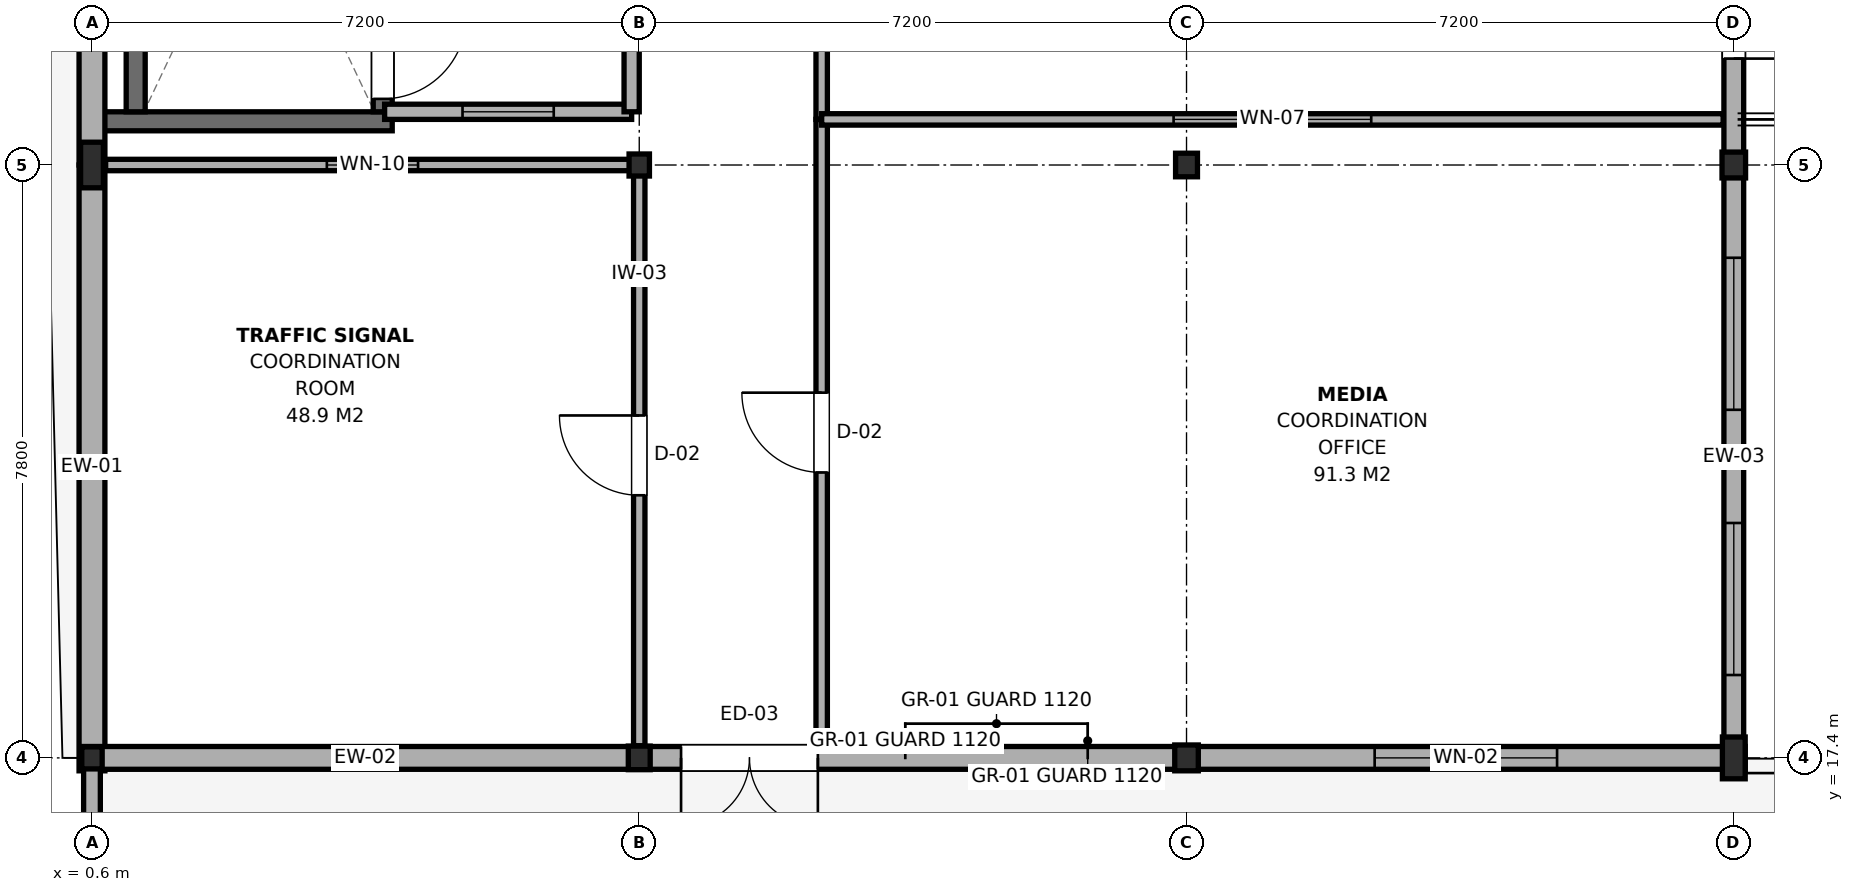
"""IFC4 building model, lengths in metres.
Left out: names, types, materials, properties, quantities, classifications, styles, units other than length and angle.
Written with IfcOpenShell. Run it as: python <this file> out.ifc"""

import sys

from ifc_helpers import new_model, si_unit, direction, frame, frame_2d, origin, origin_2d, place, context, subcontext, project, spatial, rectangle, i_section, extrude, element, fill, save


model = new_model("IFC4")
c1 = context("Model", 3, precision=1e-05, world=origin(), true_north=direction((0.0, 1.0)))
c2 = subcontext(c1, "Body", "Model", "MODEL_VIEW")
j1 = project(units=[si_unit("LENGTHUNIT", "METRE"), si_unit("PLANEANGLEUNIT", "RADIAN")], contexts=[c1])
p1 = place(None, origin())
s1 = spatial("IfcSite", under=j1, at=p1, CompositionType="ELEMENT")
p2 = place(p1, origin())
s2 = spatial("IfcBuilding", under=s1, at=p2, CompositionType="ELEMENT")
p3 = place(p2, frame((0.0, 0.0, 9.0)))
s3 = spatial("IfcBuildingStorey", under=s2, at=p3, CompositionType="ELEMENT", Elevation=9.0)
p4 = place(p3, frame((0.6, 17.4, 0.0), z_axis=(0.0, 0.0, 1.0), x_axis=(1.0, 0.0, 0.0)))
e1 = element("IfcColumn", 1, at=p4, inside=s3, PredefinedType="COLUMN", context=c2, shape_type="SweptSolid", body=[
    extrude(i_section(OverallWidth=0.268, OverallDepth=0.29, WebThickness=0.018, FlangeThickness=0.032, FilletRadius=0.024, at=origin_2d()), origin(), (0.0, 0.0, 1.0), 4.2),
])
p5 = place(p3, frame((0.6, 25.2, 0.0), z_axis=(0.0, 0.0, 1.0), x_axis=(1.0, 0.0, 0.0)))
e2 = element("IfcColumn", 2, at=p5, inside=s3, PredefinedType="COLUMN", context=c2, shape_type="SweptSolid", body=[
    extrude(i_section(OverallWidth=0.3, OverallDepth=0.6, WebThickness=0.015, FlangeThickness=0.03, FilletRadius=0.027, at=origin_2d()), origin(), (0.0, 0.0, 1.0), 4.2),
])
p6 = place(p3, frame((7.8, 17.4, 0.0), z_axis=(0.0, 0.0, 1.0), x_axis=(1.0, 0.0, 0.0)))
e3 = element("IfcColumn", 3, at=p6, inside=s3, PredefinedType="COLUMN", context=c2, shape_type="SweptSolid", body=[
    extrude(i_section(OverallWidth=0.288, OverallDepth=0.31, WebThickness=0.019, FlangeThickness=0.033, FilletRadius=0.024, at=origin_2d()), origin(), (0.0, 0.0, 1.0), 4.2),
])
p7 = place(p3, frame((7.8, 25.2, 0.0), z_axis=(0.0, 0.0, 1.0), x_axis=(1.0, 0.0, 0.0)))
e4 = element("IfcColumn", 4, at=p7, inside=s3, PredefinedType="COLUMN", context=c2, shape_type="SweptSolid", body=[
    extrude(i_section(OverallWidth=0.268, OverallDepth=0.29, WebThickness=0.018, FlangeThickness=0.032, FilletRadius=0.024, at=origin_2d()), origin(), (0.0, 0.0, 1.0), 4.2),
])
p8 = place(p3, frame((15.0, 17.4, 0.0), z_axis=(0.0, 0.0, 1.0), x_axis=(1.0, 0.0, 0.0)))
e5 = element("IfcColumn", 5, at=p8, inside=s3, PredefinedType="COLUMN", context=c2, shape_type="SweptSolid", body=[
    extrude(i_section(OverallWidth=0.31, OverallDepth=0.34, WebThickness=0.021, FlangeThickness=0.039, FilletRadius=0.027, at=origin_2d()), origin(), (0.0, 0.0, 1.0), 4.2),
])
p9 = place(p3, frame((15.0, 25.2, 0.0), z_axis=(0.0, 0.0, 1.0), x_axis=(1.0, 0.0, 0.0)))
e6 = element("IfcColumn", 6, at=p9, inside=s3, PredefinedType="COLUMN", context=c2, shape_type="SweptSolid", body=[
    extrude(i_section(OverallWidth=0.288, OverallDepth=0.31, WebThickness=0.019, FlangeThickness=0.033, FilletRadius=0.024, at=origin_2d()), origin(), (0.0, 0.0, 1.0), 4.2),
])
p10 = place(p3, frame((22.2, 17.4, 0.0), z_axis=(0.0, 0.0, 1.0), x_axis=(1.0, 0.0, 0.0)))
e7 = element("IfcColumn", 7, at=p10, inside=s3, PredefinedType="COLUMN", context=c2, shape_type="SweptSolid", body=[
    extrude(i_section(OverallWidth=0.3, OverallDepth=0.55, WebThickness=0.015, FlangeThickness=0.029, FilletRadius=0.027, at=origin_2d()), origin(), (0.0, 0.0, 1.0), 4.2),
])
p11 = place(p3, frame((22.2, 25.2, 0.0), z_axis=(0.0, 0.0, 1.0), x_axis=(1.0, 0.0, 0.0)))
e8 = element("IfcColumn", 8, at=p11, inside=s3, PredefinedType="COLUMN", context=c2, shape_type="SweptSolid", body=[
    extrude(i_section(OverallWidth=0.31, OverallDepth=0.34, WebThickness=0.021, FlangeThickness=0.039, FilletRadius=0.027, at=origin_2d()), origin(), (0.0, 0.0, 1.0), 4.2),
])
p12 = place(p3, frame((0.75, 25.775, 0.0), z_axis=(0.0, 0.0, 1.0), x_axis=(1.0, 0.0, 0.0)))
e9 = element("IfcWall", 9, at=p12, inside=s3, PredefinedType="SHEAR", context=c2, shape_type="SweptSolid", body=[
    extrude(rectangle(XDim=3.8, YDim=0.25, at=frame_2d((1.9, 0.0))), origin(), (0.0, 0.0, 1.0), 3.98),
])
p13 = place(p3, frame((1.175, 25.9, 0.0), z_axis=(0.0, 0.0, 1.0), x_axis=(0.0, 1.0, 0.0)))
e10 = element("IfcWall", 10, at=p13, inside=s3, PredefinedType="SHEAR", context=c2, shape_type="SweptSolid", body=[
    extrude(rectangle(XDim=6.4, YDim=0.25, at=frame_2d((3.2, 0.0))), origin(), (0.0, 0.0, 1.0), 3.98),
])
p14 = place(p3, frame((4.425, 25.9, 0.0), z_axis=(0.0, 0.0, 1.0), x_axis=(0.0, 1.0, 0.0)))
e11 = element("IfcWall", 11, at=p14, inside=s3, PredefinedType="SHEAR", context=c2, shape_type="SweptSolid", body=[
    extrude(rectangle(XDim=6.4, YDim=0.25, at=frame_2d((3.2, 0.0))), origin(), (0.0, 0.0, 1.0), 3.98),
])
p15 = place(p14, frame((0.17, 0.0, 0.0)))
e12 = element("IfcOpeningElement", 12, at=p15, cuts=e11, PredefinedType="OPENING", context=c2, shape_type="SweptSolid", body=[
    extrude(rectangle(XDim=1.1, YDim=2.15, at=frame_2d((0.55, 1.075))), frame((0.0, 0.14, 0.0), z_axis=(0.0, -1.0, 0.0), x_axis=(1.0, 0.0, 0.0)), (0.0, 0.0, 1.0), 0.28),
])
p16 = place(p3, frame((0.6, 17.23, 0.0), z_axis=(0.0, 0.0, 1.0), x_axis=(0.0, 1.0, 0.0)))
e13 = element("IfcWall", 13, at=p16, inside=s3, PredefinedType="SOLIDWALL", context=c2, shape_type="SweptSolid", body=[
    extrude(rectangle(XDim=7.97, YDim=0.34, at=frame_2d((3.985, 0.0))), origin(), (0.0, 0.0, 1.0), 3.525),
])
p17 = place(p3, frame((0.6, 25.2, 0.0), z_axis=(0.0, 0.0, 1.0), x_axis=(0.0, 1.0, 0.0)))
e14 = element("IfcWall", 14, at=p17, inside=s3, PredefinedType="SOLIDWALL", context=c2, shape_type="SweptSolid", body=[
    extrude(rectangle(XDim=5.6, YDim=0.34, at=frame_2d((2.8, 0.0))), origin(), (0.0, 0.0, 1.0), 3.625),
])
p18 = place(p3, frame((22.2, 17.27, 0.0), z_axis=(0.0, 0.0, 1.0), x_axis=(0.0, 1.0, 0.0)))
e15 = element("IfcWall", 15, at=p18, inside=s3, PredefinedType="SOLIDWALL", context=c2, shape_type="SweptSolid", body=[
    extrude(rectangle(XDim=7.93, YDim=0.26, at=frame_2d((3.965, 0.0))), origin(), (0.0, 0.0, 1.0), 3.525),
])
p19 = place(p18, frame((1.22, 0.0, 0.9)))
e16 = element("IfcOpeningElement", 16, at=p19, cuts=e15, PredefinedType="OPENING", context=c2, shape_type="SweptSolid", body=[
    extrude(rectangle(XDim=2.0, YDim=1.8, at=frame_2d((1.0, 0.9))), frame((0.0, 0.145, 0.0), z_axis=(0.0, -1.0, 0.0), x_axis=(1.0, 0.0, 0.0)), (0.0, 0.0, 1.0), 0.29),
])
p20 = place(p18, frame((4.71, 0.0, 0.9)))
e17 = element("IfcOpeningElement", 17, at=p20, cuts=e15, PredefinedType="OPENING", context=c2, shape_type="SweptSolid", body=[
    extrude(rectangle(XDim=2.0, YDim=1.8, at=frame_2d((1.0, 0.9))), frame((0.0, 0.145, 0.0), z_axis=(0.0, -1.0, 0.0), x_axis=(1.0, 0.0, 0.0)), (0.0, 0.0, 1.0), 0.29),
])
p21 = place(p3, frame((22.2, 25.2, 0.0), z_axis=(0.0, 0.0, 1.0), x_axis=(0.0, 1.0, 0.0)))
e18 = element("IfcWall", 18, at=p21, inside=s3, PredefinedType="SOLIDWALL", context=c2, shape_type="SweptSolid", body=[
    extrude(rectangle(XDim=5.6, YDim=0.26, at=frame_2d((2.8, 0.0))), origin(), (0.0, 0.0, 1.0), 3.525),
])
p22 = place(p21, frame((1.4, 0.0, 0.0)))
e19 = element("IfcOpeningElement", 19, at=p22, cuts=e18, PredefinedType="OPENING", context=c2, shape_type="SweptSolid", body=[
    extrude(rectangle(XDim=1.8, YDim=2.2, at=frame_2d((0.9, 1.1))), frame((0.0, 0.145, 0.0), z_axis=(0.0, -1.0, 0.0), x_axis=(1.0, 0.0, 0.0)), (0.0, 0.0, 1.0), 0.29),
])
p23 = place(p3, frame((0.45, 17.4, 0.0), z_axis=(0.0, 0.0, 1.0), x_axis=(1.0, 0.0, 0.0)))
e20 = element("IfcWall", 20, at=p23, inside=s3, PredefinedType="SOLIDWALL", context=c2, shape_type="SweptSolid", body=[
    extrude(rectangle(XDim=7.35, YDim=0.3, at=frame_2d((3.675, 0.0))), origin(), (0.0, 0.0, 1.0), 3.625),
])
p24 = place(p3, frame((7.8, 17.4, 0.0), z_axis=(0.0, 0.0, 1.0), x_axis=(1.0, 0.0, 0.0)))
e21 = element("IfcWall", 21, at=p24, inside=s3, PredefinedType="SOLIDWALL", context=c2, shape_type="SweptSolid", body=[
    extrude(rectangle(XDim=7.2, YDim=0.3, at=frame_2d((3.6, 0.0))), origin(), (0.0, 0.0, 1.0), 3.375),
])
p25 = place(p24, frame((0.55, 0.0, 0.0)))
e22 = element("IfcOpeningElement", 22, at=p25, cuts=e21, PredefinedType="OPENING", context=c2, shape_type="SweptSolid", body=[
    extrude(rectangle(XDim=1.8, YDim=2.2, at=frame_2d((0.9, 1.1))), frame((0.0, 0.165, 0.0), z_axis=(0.0, -1.0, 0.0), x_axis=(1.0, 0.0, 0.0)), (0.0, 0.0, 1.0), 0.33),
])
p26 = place(p3, frame((15.0, 17.4, 0.0), z_axis=(0.0, 0.0, 1.0), x_axis=(1.0, 0.0, 0.0)))
e23 = element("IfcWall", 23, at=p26, inside=s3, PredefinedType="SOLIDWALL", context=c2, shape_type="SweptSolid", body=[
    extrude(rectangle(XDim=7.35, YDim=0.3, at=frame_2d((3.675, 0.0))), origin(), (0.0, 0.0, 1.0), 3.375),
])
p27 = place(p26, frame((2.475, 0.0, 0.9)))
e24 = element("IfcOpeningElement", 24, at=p27, cuts=e23, PredefinedType="OPENING", context=c2, shape_type="SweptSolid", body=[
    extrude(rectangle(XDim=2.4, YDim=2.1, at=frame_2d((1.2, 1.05))), frame((0.0, 0.165, 0.0), z_axis=(0.0, -1.0, 0.0), x_axis=(1.0, 0.0, 0.0)), (0.0, 0.0, 1.0), 0.33),
])
p28 = place(p3, frame((0.6, 17.4, 0.0), z_axis=(0.0, 0.0, 1.0), x_axis=(0.0, -1.0, 0.0)))
e25 = element("IfcWall", 25, at=p28, inside=s3, PredefinedType="PARAPET", context=c2, shape_type="SweptSolid", body=[
    extrude(rectangle(XDim=16.2, YDim=0.22, at=frame_2d((8.1, 0.0))), origin(), (0.0, 0.0, 1.0), 1.15),
])
p29 = place(p3, frame((4.45, 25.9, 0.0), z_axis=(0.0, 0.0, 1.0), x_axis=(1.0, 0.0, 0.0)))
e26 = element("IfcWall", 26, at=p29, inside=s3, PredefinedType="PARTITIONING", context=c2, shape_type="SweptSolid", body=[
    extrude(rectangle(XDim=3.25, YDim=0.2, at=frame_2d((1.625, 0.0))), origin(), (0.0, 0.0, 1.0), 3.475),
])
p30 = place(p29, frame((1.025, 0.0, 0.95)))
e27 = element("IfcOpeningElement", 27, at=p30, cuts=e26, PredefinedType="OPENING", context=c2, shape_type="SweptSolid", body=[
    extrude(rectangle(XDim=1.2, YDim=1.5, at=frame_2d((0.6, 0.75))), frame((0.0, 0.115, 0.0), z_axis=(0.0, -1.0, 0.0), x_axis=(1.0, 0.0, 0.0)), (0.0, 0.0, 1.0), 0.23),
])
p31 = place(p3, frame((7.7, 25.9, 0.0), z_axis=(0.0, 0.0, 1.0), x_axis=(0.0, 1.0, 0.0)))
e28 = element("IfcWall", 28, at=p31, inside=s3, PredefinedType="PARTITIONING", context=c2, shape_type="SweptSolid", body=[
    extrude(rectangle(XDim=3.6, YDim=0.2, at=frame_2d((1.8, 0.0))), origin(), (0.0, 0.0, 1.0), 3.475),
])
p32 = place(p31, frame((1.25, 0.0, 0.0)))
e29 = element("IfcOpeningElement", 29, at=p32, cuts=e28, PredefinedType="OPENING", context=c2, shape_type="SweptSolid", body=[
    extrude(rectangle(XDim=1.1, YDim=2.15, at=frame_2d((0.55, 1.075))), frame((0.0, 0.115, 0.0), z_axis=(0.0, -1.0, 0.0), x_axis=(1.0, 0.0, 0.0)), (0.0, 0.0, 1.0), 0.23),
])
p33 = place(p3, frame((7.8, 17.56, 0.0), z_axis=(0.0, 0.0, 1.0), x_axis=(0.0, 1.0, 0.0)))
e30 = element("IfcWall", 30, at=p33, inside=s3, PredefinedType="PARTITIONING", context=c2, shape_type="SweptSolid", body=[
    extrude(rectangle(XDim=7.64, YDim=0.15, at=frame_2d((3.82, 0.0))), origin(), (0.0, 0.0, 1.0), 3.425),
])
p34 = place(p33, frame((3.295, 0.0, 0.0)))
e31 = element("IfcOpeningElement", 31, at=p34, cuts=e30, PredefinedType="OPENING", context=c2, shape_type="SweptSolid", body=[
    extrude(rectangle(XDim=1.05, YDim=2.15, at=frame_2d((0.525, 1.075))), frame((0.0, 0.09, 0.0), z_axis=(0.0, -1.0, 0.0), x_axis=(1.0, 0.0, 0.0)), (0.0, 0.0, 1.0), 0.18),
])
p35 = place(p3, frame((0.78, 25.2, 0.0), z_axis=(0.0, 0.0, 1.0), x_axis=(1.0, 0.0, 0.0)))
e32 = element("IfcWall", 32, at=p35, inside=s3, PredefinedType="PARTITIONING", context=c2, shape_type="SweptSolid", body=[
    extrude(rectangle(XDim=7.02, YDim=0.15, at=frame_2d((3.51, 0.0))), origin(), (0.0, 0.0, 1.0), 3.425),
])
p36 = place(p35, frame((2.91, 0.0, 0.95)))
e33 = element("IfcOpeningElement", 33, at=p36, cuts=e32, PredefinedType="OPENING", context=c2, shape_type="SweptSolid", body=[
    extrude(rectangle(XDim=1.2, YDim=1.5, at=frame_2d((0.6, 0.75))), frame((0.0, 0.09, 0.0), z_axis=(0.0, -1.0, 0.0), x_axis=(1.0, 0.0, 0.0)), (0.0, 0.0, 1.0), 0.18),
])
p37 = place(p3, frame((10.2, 17.56, 0.0), z_axis=(0.0, 0.0, 1.0), x_axis=(0.0, 1.0, 0.0)))
e34 = element("IfcWall", 34, at=p37, inside=s3, PredefinedType="PARTITIONING", context=c2, shape_type="SweptSolid", body=[
    extrude(rectangle(XDim=8.24, YDim=0.15, at=frame_2d((4.12, 0.0))), origin(), (0.0, 0.0, 1.0), 3.475),
])
p38 = place(p37, frame((3.595, 0.0, 0.0)))
e35 = element("IfcOpeningElement", 35, at=p38, cuts=e34, PredefinedType="OPENING", context=c2, shape_type="SweptSolid", body=[
    extrude(rectangle(XDim=1.05, YDim=2.15, at=frame_2d((0.525, 1.075))), frame((0.0, 0.09, 0.0), z_axis=(0.0, -1.0, 0.0), x_axis=(1.0, 0.0, 0.0)), (0.0, 0.0, 1.0), 0.18),
])
p39 = place(p3, frame((10.2, 25.8, 0.0), z_axis=(0.0, 0.0, 1.0), x_axis=(0.0, 1.0, 0.0)))
e36 = element("IfcWall", 36, at=p39, inside=s3, PredefinedType="PARTITIONING", context=c2, shape_type="SweptSolid", body=[
    extrude(rectangle(XDim=3.8, YDim=0.15, at=frame_2d((1.9, 0.0))), origin(), (0.0, 0.0, 1.0), 3.975),
])
p40 = place(p39, frame((1.15, 0.0, 0.0)))
e37 = element("IfcOpeningElement", 37, at=p40, cuts=e36, PredefinedType="OPENING", context=c2, shape_type="SweptSolid", body=[
    extrude(rectangle(XDim=1.5, YDim=2.15, at=frame_2d((0.75, 1.075))), frame((0.0, 0.09, 0.0), z_axis=(0.0, -1.0, 0.0), x_axis=(1.0, 0.0, 0.0)), (0.0, 0.0, 1.0), 0.18),
])
p41 = place(p3, frame((10.2, 25.8, 0.0), z_axis=(0.0, 0.0, 1.0), x_axis=(1.0, 0.0, 0.0)))
e38 = element("IfcWall", 38, at=p41, inside=s3, PredefinedType="PARTITIONING", context=c2, shape_type="SweptSolid", body=[
    extrude(rectangle(XDim=11.86, YDim=0.15, at=frame_2d((5.93, 0.0))), origin(), (0.0, 0.0, 1.0), 3.375),
])
p42 = place(p41, frame((4.63, 0.0, 0.95)))
e39 = element("IfcOpeningElement", 39, at=p42, cuts=e38, PredefinedType="OPENING", context=c2, shape_type="SweptSolid", body=[
    extrude(rectangle(XDim=2.6, YDim=1.5, at=frame_2d((1.3, 0.75))), frame((0.0, 0.09, 0.0), z_axis=(0.0, -1.0, 0.0), x_axis=(1.0, 0.0, 0.0)), (0.0, 0.0, 1.0), 0.18),
])
p43 = place(p19, origin())
e40 = element("IfcWindow", 40, at=p43, inside=s3, PartitioningType="SINGLE_PANEL", PredefinedType="WINDOW", context=c2, shape_type="SweptSolid", body=[
    extrude(rectangle(XDim=2.0, YDim=1.8, at=frame_2d((1.0, 0.9))), frame((0.0, 0.03, 0.0), z_axis=(0.0, -1.0, 0.0), x_axis=(1.0, 0.0, 0.0)), (0.0, 0.0, 1.0), 0.06),
])
fill(e16, e40)
p44 = place(p20, origin())
e41 = element("IfcWindow", 41, at=p44, inside=s3, PartitioningType="SINGLE_PANEL", PredefinedType="WINDOW", context=c2, shape_type="SweptSolid", body=[
    extrude(rectangle(XDim=2.0, YDim=1.8, at=frame_2d((1.0, 0.9))), frame((0.0, 0.03, 0.0), z_axis=(0.0, -1.0, 0.0), x_axis=(1.0, 0.0, 0.0)), (0.0, 0.0, 1.0), 0.06),
])
fill(e17, e41)
p45 = place(p22, frame((1.8, 0.0, 0.0), z_axis=(0.0, 0.0, 1.0), x_axis=(-1.0, 0.0, 0.0)))
e42 = element("IfcDoor", 42, at=p45, inside=s3, OperationType="DOUBLE_DOOR_SINGLE_SWING", PredefinedType="DOOR", context=c2, shape_type="SweptSolid", body=[
    extrude(rectangle(XDim=1.8, YDim=2.2, at=frame_2d((0.9, 1.1))), frame((0.0, 0.025, 0.0), z_axis=(0.0, -1.0, 0.0), x_axis=(1.0, 0.0, 0.0)), (0.0, 0.0, 1.0), 0.05),
])
fill(e19, e42)
p46 = place(p25, frame((1.8, 0.0, 0.0), z_axis=(0.0, 0.0, 1.0), x_axis=(-1.0, 0.0, 0.0)))
e43 = element("IfcDoor", 43, at=p46, inside=s3, OperationType="DOUBLE_DOOR_SINGLE_SWING", PredefinedType="DOOR", context=c2, shape_type="SweptSolid", body=[
    extrude(rectangle(XDim=1.8, YDim=2.2, at=frame_2d((0.9, 1.1))), frame((0.0, 0.025, 0.0), z_axis=(0.0, -1.0, 0.0), x_axis=(1.0, 0.0, 0.0)), (0.0, 0.0, 1.0), 0.05),
])
fill(e22, e43)
p47 = place(p27, origin())
e44 = element("IfcWindow", 44, at=p47, inside=s3, PartitioningType="SINGLE_PANEL", PredefinedType="WINDOW", context=c2, shape_type="SweptSolid", body=[
    extrude(rectangle(XDim=2.4, YDim=2.1, at=frame_2d((1.2, 1.05))), frame((0.0, 0.03, 0.0), z_axis=(0.0, -1.0, 0.0), x_axis=(1.0, 0.0, 0.0)), (0.0, 0.0, 1.0), 0.06),
])
fill(e24, e44)
p48 = place(p15, frame((1.1, 0.0, 0.0), z_axis=(0.0, 0.0, 1.0), x_axis=(-1.0, 0.0, 0.0)))
e45 = element("IfcDoor", 45, at=p48, inside=s3, OperationType="SINGLE_SWING_LEFT", PredefinedType="DOOR", context=c2, shape_type="SweptSolid", body=[
    extrude(rectangle(XDim=1.1, YDim=2.15, at=frame_2d((0.55, 1.075))), frame((0.0, 0.025, 0.0), z_axis=(0.0, -1.0, 0.0), x_axis=(1.0, 0.0, 0.0)), (0.0, 0.0, 1.0), 0.05),
])
fill(e12, e45)
p49 = place(p30, origin())
e46 = element("IfcWindow", 46, at=p49, inside=s3, PartitioningType="SINGLE_PANEL", PredefinedType="WINDOW", context=c2, shape_type="SweptSolid", body=[
    extrude(rectangle(XDim=1.2, YDim=1.5, at=frame_2d((0.6, 0.75))), frame((0.0, 0.03, 0.0), z_axis=(0.0, -1.0, 0.0), x_axis=(1.0, 0.0, 0.0)), (0.0, 0.0, 1.0), 0.06),
])
fill(e27, e46)
p50 = place(p34, origin())
e47 = element("IfcDoor", 47, at=p50, inside=s3, OperationType="SINGLE_SWING_RIGHT", PredefinedType="DOOR", context=c2, shape_type="SweptSolid", body=[
    extrude(rectangle(XDim=1.05, YDim=2.15, at=frame_2d((0.525, 1.075))), frame((0.0, 0.025, 0.0), z_axis=(0.0, -1.0, 0.0), x_axis=(1.0, 0.0, 0.0)), (0.0, 0.0, 1.0), 0.05),
])
fill(e31, e47)
p51 = place(p36, origin())
e48 = element("IfcWindow", 48, at=p51, inside=s3, PartitioningType="SINGLE_PANEL", PredefinedType="WINDOW", context=c2, shape_type="SweptSolid", body=[
    extrude(rectangle(XDim=1.2, YDim=1.5, at=frame_2d((0.6, 0.75))), frame((0.0, 0.03, 0.0), z_axis=(0.0, -1.0, 0.0), x_axis=(1.0, 0.0, 0.0)), (0.0, 0.0, 1.0), 0.06),
])
fill(e33, e48)
p52 = place(p38, origin())
e49 = element("IfcDoor", 49, at=p52, inside=s3, OperationType="SINGLE_SWING_RIGHT", PredefinedType="DOOR", context=c2, shape_type="SweptSolid", body=[
    extrude(rectangle(XDim=1.05, YDim=2.15, at=frame_2d((0.525, 1.075))), frame((0.0, 0.025, 0.0), z_axis=(0.0, -1.0, 0.0), x_axis=(1.0, 0.0, 0.0)), (0.0, 0.0, 1.0), 0.05),
])
fill(e35, e49)
p53 = place(p42, origin())
e50 = element("IfcWindow", 50, at=p53, inside=s3, PartitioningType="SINGLE_PANEL", PredefinedType="WINDOW", context=c2, shape_type="SweptSolid", body=[
    extrude(rectangle(XDim=2.6, YDim=1.5, at=frame_2d((1.3, 0.75))), frame((0.0, 0.03, 0.0), z_axis=(0.0, -1.0, 0.0), x_axis=(1.0, 0.0, 0.0)), (0.0, 0.0, 1.0), 0.06),
])
fill(e39, e50)
save(model, sys.argv[1])
